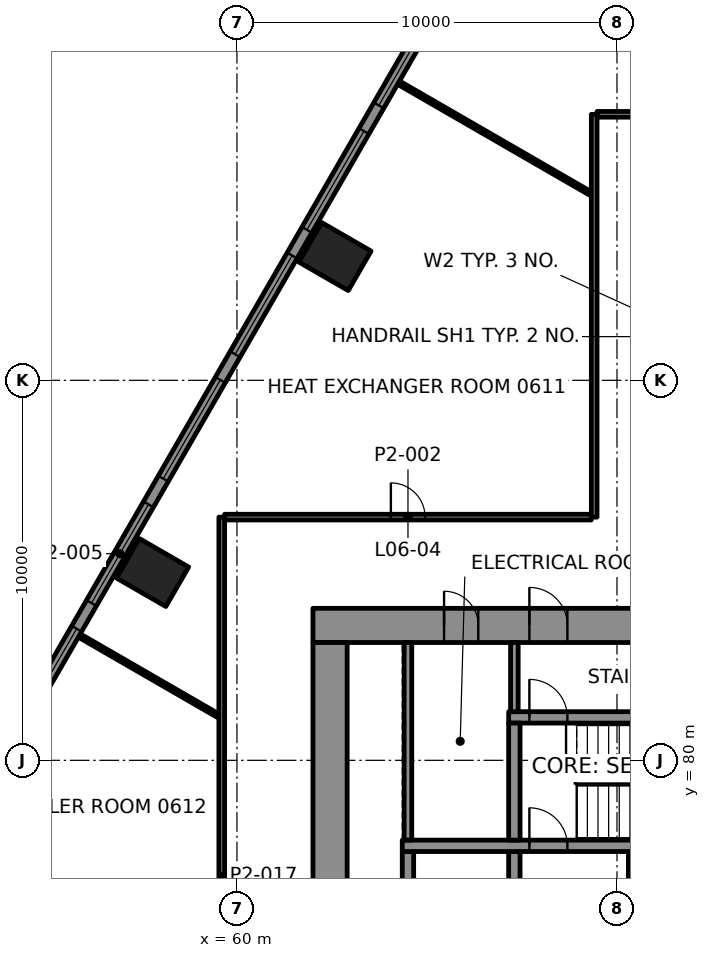
"""IFC4 building model, lengths in metres.
Left out: names, types, materials, properties, quantities, classifications, styles, units other than length and angle.
Written with IfcOpenShell. Run it as: python <this file> out.ifc"""

import sys

from ifc_helpers import new_model, si_unit, direction, frame, frame_2d, origin, origin_2d, place, context, subcontext, project, spatial, rectangle, extrude, element, fill, save


model = new_model("IFC4")
c1 = context("Model", 3, precision=1e-05, world=origin(), true_north=direction((0.0, 1.0)))
c2 = subcontext(c1, "Body", "Model", "MODEL_VIEW")
j1 = project(units=[si_unit("LENGTHUNIT", "METRE"), si_unit("PLANEANGLEUNIT", "RADIAN")], contexts=[c1])
p1 = place(None, origin())
s1 = spatial("IfcSite", under=j1, at=p1, CompositionType="ELEMENT")
p2 = place(p1, origin())
s2 = spatial("IfcBuilding", under=s1, at=p2, CompositionType="ELEMENT")
p3 = place(p2, frame((0.0, 0.0, 31.0)))
s3 = spatial("IfcBuildingStorey", under=s2, at=p3, CompositionType="ELEMENT", Elevation=31.0)
for number, where, z_axis, x_axis in (
    (1, (62.579, 93.256, -0.0), (0.0, 0.0, 1.0), (-0.5, -0.866, 0.0)),
    (2, (57.78, 84.942, -0.0), (0.0, 0.0, 1.0), (-0.5, -0.866, 0.0)),
):
    element("IfcColumn", number, at=place(p3, frame(where, z_axis=z_axis, x_axis=x_axis)), inside=s3, PredefinedType="COLUMN", context=c2, shape_type="SweptSolid", body=[
        extrude(rectangle(XDim=1.2, YDim=1.5, at=origin_2d()), origin(), (0.0, 0.0, 1.0), 4.5),
    ])
p4 = place(p3, frame((62.0, 83.55, 0.0), z_axis=(0.0, 0.0, 1.0), x_axis=(1.0, 0.0, 0.0)))
e3 = element("IfcWall", 3, at=p4, inside=s3, PredefinedType="SHEAR", context=c2, shape_type="SweptSolid", body=[
    extrude(rectangle(XDim=26.0, YDim=0.9, at=frame_2d((13.0, 0.0))), origin(), (0.0, 0.0, 1.0), 4.05),
])
p5 = place(p4, frame((5.695, 0.0, 0.0)))
e4 = element("IfcOpeningElement", 4, at=p5, cuts=e3, PredefinedType="OPENING", context=c2, shape_type="SweptSolid", body=[
    extrude(rectangle(XDim=1.0, YDim=2.1, at=frame_2d((0.5, 1.05))), frame((0.0, 0.46, 0.0), z_axis=(0.0, -1.0, 0.0), x_axis=(1.0, 0.0, 0.0)), (0.0, 0.0, 1.0), 0.92),
])
p6 = place(p4, frame((19.505, 0.0, 0.0)))
e5 = element("IfcOpeningElement", 5, at=p6, cuts=e3, PredefinedType="OPENING", context=c2, shape_type="SweptSolid", body=[
    extrude(rectangle(XDim=1.0, YDim=2.1, at=frame_2d((0.5, 1.05))), frame((0.0, 0.46, 0.0), z_axis=(0.0, -1.0, 0.0), x_axis=(1.0, 0.0, 0.0)), (0.0, 0.0, 1.0), 0.92),
])
p7 = place(p4, frame((3.45, 0.0, 0.0)))
e6 = element("IfcOpeningElement", 6, at=p7, cuts=e3, PredefinedType="OPENING", context=c2, shape_type="SweptSolid", body=[
    extrude(rectangle(XDim=0.9, YDim=2.1, at=frame_2d((0.45, 1.05))), frame((0.0, 0.46, 0.0), z_axis=(0.0, -1.0, 0.0), x_axis=(1.0, 0.0, 0.0)), (0.0, 0.0, 1.0), 0.92),
])
p8 = place(p4, frame((12.65, 0.0, 0.0)))
e7 = element("IfcOpeningElement", 7, at=p8, cuts=e3, PredefinedType="OPENING", context=c2, shape_type="SweptSolid", body=[
    extrude(rectangle(XDim=0.9, YDim=2.1, at=frame_2d((0.45, 1.05))), frame((0.0, 0.46, 0.0), z_axis=(0.0, -1.0, 0.0), x_axis=(1.0, 0.0, 0.0)), (0.0, 0.0, 1.0), 0.92),
])
p9 = place(p4, frame((22.55, 0.0, 0.0)))
e8 = element("IfcOpeningElement", 8, at=p9, cuts=e3, PredefinedType="OPENING", context=c2, shape_type="SweptSolid", body=[
    extrude(rectangle(XDim=0.9, YDim=2.1, at=frame_2d((0.45, 1.05))), frame((0.0, 0.46, 0.0), z_axis=(0.0, -1.0, 0.0), x_axis=(1.0, 0.0, 0.0)), (0.0, 0.0, 1.0), 0.92),
])
p10 = place(p3, frame((62.45, 66.9, 0.0), z_axis=(0.0, 0.0, 1.0), x_axis=(0.0, 1.0, 0.0)))
e9 = element("IfcWall", 9, at=p10, inside=s3, PredefinedType="SHEAR", context=c2, shape_type="SweptSolid", body=[
    extrude(rectangle(XDim=16.2, YDim=0.9, at=frame_2d((8.1, 0.0))), origin(), (0.0, 0.0, 1.0), 4.05),
])
p11 = place(p10, frame((5.5, 0.0, 0.0)))
e10 = element("IfcOpeningElement", 10, at=p11, cuts=e9, PredefinedType="OPENING", context=c2, shape_type="SweptSolid", body=[
    extrude(rectangle(XDim=1.8, YDim=2.1, at=frame_2d((0.9, 1.05))), frame((0.0, 0.46, 0.0), z_axis=(0.0, -1.0, 0.0), x_axis=(1.0, 0.0, 0.0)), (0.0, 0.0, 1.0), 0.92),
])
for number, where, z_axis, x_axis in (
    (11, (64.5, 75.0, 0.0), (0.0, 0.0, 1.0), (0.0, 1.0, 0.0)),
    (12, (67.3, 75.0, 0.0), (0.0, 0.0, 1.0), (0.0, 1.0, 0.0)),
):
    element("IfcWall", number, at=place(p3, frame(where, z_axis=z_axis, x_axis=x_axis)), inside=s3, PredefinedType="SHEAR", context=c2, shape_type="SweptSolid", body=[
        extrude(rectangle(XDim=2.6, YDim=0.3, at=frame_2d((1.3, 0.0))), origin(), (0.0, 0.0, 1.0), 4.05),
    ])
p12 = place(p3, frame((70.45, 75.0, 0.0), z_axis=(0.0, 0.0, 1.0), x_axis=(0.0, 1.0, 0.0)))
e13 = element("IfcWall", 13, at=p12, inside=s3, PredefinedType="SHEAR", context=c2, shape_type="SweptSolid", body=[
    extrude(rectangle(XDim=2.6, YDim=0.3, at=frame_2d((1.3, 0.0))), origin(), (0.0, 0.0, 1.0), 4.05),
])
p13 = place(p12, frame((0.15, 0.0, 0.0)))
e14 = element("IfcOpeningElement", 14, at=p13, cuts=e13, PredefinedType="OPENING", context=c2, shape_type="SweptSolid", body=[
    extrude(rectangle(XDim=1.1, YDim=2.1, at=frame_2d((0.55, 1.05))), frame((0.0, 0.16, 0.0), z_axis=(0.0, -1.0, 0.0), x_axis=(1.0, 0.0, 0.0)), (0.0, 0.0, 1.0), 0.32),
])
p14 = place(p3, frame((64.35, 77.75, 0.0), z_axis=(0.0, 0.0, 1.0), x_axis=(1.0, 0.0, 0.0)))
e15 = element("IfcWall", 15, at=p14, inside=s3, PredefinedType="SHEAR", context=c2, shape_type="SweptSolid", body=[
    extrude(rectangle(XDim=22.75, YDim=0.3, at=frame_2d((11.375, 0.0))), origin(), (0.0, 0.0, 1.0), 4.05),
])
p15 = place(p14, frame((3.345, 0.0, 0.0)))
e16 = element("IfcOpeningElement", 16, at=p15, cuts=e15, PredefinedType="OPENING", context=c2, shape_type="SweptSolid", body=[
    extrude(rectangle(XDim=1.0, YDim=2.1, at=frame_2d((0.5, 1.05))), frame((0.0, 0.16, 0.0), z_axis=(0.0, -1.0, 0.0), x_axis=(1.0, 0.0, 0.0)), (0.0, 0.0, 1.0), 0.32),
])
p16 = place(p3, frame((67.15, 81.13, 0.0), z_axis=(0.0, 0.0, 1.0), x_axis=(1.0, 0.0, 0.0)))
e17 = element("IfcWall", 17, at=p16, inside=s3, PredefinedType="SHEAR", context=c2, shape_type="SweptSolid", body=[
    extrude(rectangle(XDim=6.91, YDim=0.3, at=frame_2d((3.455, 0.0))), origin(), (0.0, 0.0, 1.0), 4.05),
])
p17 = place(p16, frame((0.545, 0.0, 0.0)))
e18 = element("IfcOpeningElement", 18, at=p17, cuts=e17, PredefinedType="OPENING", context=c2, shape_type="SweptSolid", body=[
    extrude(rectangle(XDim=1.0, YDim=2.1, at=frame_2d((0.5, 1.05))), frame((0.0, 0.16, 0.0), z_axis=(0.0, -1.0, 0.0), x_axis=(1.0, 0.0, 0.0)), (0.0, 0.0, 1.0), 0.32),
])
p18 = place(p3, frame((67.3, 77.9, 0.0), z_axis=(0.0, 0.0, 1.0), x_axis=(0.0, 1.0, 0.0)))
e19 = element("IfcWall", 19, at=p18, inside=s3, PredefinedType="SHEAR", context=c2, shape_type="SweptSolid", body=[
    extrude(rectangle(XDim=3.08, YDim=0.3, at=frame_2d((1.54, 0.0))), origin(), (0.0, 0.0, 1.0), 4.05),
])
p19 = place(p3, frame((59.676, 86.4, 0.0), z_axis=(0.0, 0.0, 1.0), x_axis=(1.0, 0.0, 0.0)))
e20 = element("IfcWall", 20, at=p19, inside=s3, PredefinedType="PARTITIONING", context=c2, shape_type="SweptSolid", body=[
    extrude(rectangle(XDim=9.649, YDim=0.15, at=frame_2d((4.825, 0.0))), origin(), (0.0, 0.0, 1.0), 3.45),
])
p20 = place(p19, frame((4.375, 0.0, 0.0)))
e21 = element("IfcOpeningElement", 21, at=p20, cuts=e20, PredefinedType="OPENING", context=c2, shape_type="SweptSolid", body=[
    extrude(rectangle(XDim=0.9, YDim=2.1, at=frame_2d((0.45, 1.05))), frame((0.0, 0.085, 0.0), z_axis=(0.0, -1.0, 0.0), x_axis=(1.0, 0.0, 0.0)), (0.0, 0.0, 1.0), 0.17),
])
p21 = place(p3, frame((69.476, 97.0, 0.0), z_axis=(0.0, 0.0, 1.0), x_axis=(1.0, 0.0, 0.0)))
e22 = element("IfcWall", 22, at=p21, inside=s3, PredefinedType="PARTITIONING", context=c2, shape_type="SweptSolid", body=[
    extrude(rectangle(XDim=4.25, YDim=0.15, at=frame_2d((2.125, 0.0))), origin(), (0.0, 0.0, 1.0), 3.45),
])
p22 = place(p21, frame((1.675, 0.0, 0.0)))
e23 = element("IfcOpeningElement", 23, at=p22, cuts=e22, PredefinedType="OPENING", context=c2, shape_type="SweptSolid", body=[
    extrude(rectangle(XDim=0.9, YDim=2.1, at=frame_2d((0.45, 1.05))), frame((0.0, 0.085, 0.0), z_axis=(0.0, -1.0, 0.0), x_axis=(1.0, 0.0, 0.0)), (0.0, 0.0, 1.0), 0.17),
])
p23 = place(p3, frame((69.4, 86.4, 0.0), z_axis=(0.0, 0.0, 1.0), x_axis=(0.0, 1.0, 0.0)))
e24 = element("IfcWall", 24, at=p23, inside=s3, PredefinedType="PARTITIONING", context=c2, shape_type="SweptSolid", body=[
    extrude(rectangle(XDim=10.6, YDim=0.15, at=frame_2d((5.3, 0.0))), origin(), (0.0, 0.0, 1.0), 3.45),
])
p24 = place(p3, frame((59.6, 67.494, 0.0), z_axis=(0.0, 0.0, 1.0), x_axis=(0.0, 1.0, 0.0)))
e25 = element("IfcWall", 25, at=p24, inside=s3, PredefinedType="PARTITIONING", context=c2, shape_type="SweptSolid", body=[
    extrude(rectangle(XDim=18.905, YDim=0.15, at=frame_2d((9.453, 0.0))), origin(), (0.0, 0.0, 1.0), 3.45),
])
p25 = place(p24, frame((7.633, 0.0, 0.0)))
e26 = element("IfcOpeningElement", 26, at=p25, cuts=e25, PredefinedType="OPENING", context=c2, shape_type="SweptSolid", body=[
    extrude(rectangle(XDim=0.9, YDim=2.1, at=frame_2d((0.45, 1.05))), frame((0.0, 0.085, 0.0), z_axis=(0.0, -1.0, 0.0), x_axis=(1.0, 0.0, 0.0)), (0.0, 0.0, 1.0), 0.17),
])
p26 = place(p3, frame((69.299, 94.919, 0.0), z_axis=(0.0, 0.0, 1.0), x_axis=(-0.866023528471, 0.500003248124, 0.0)))
e27 = element("IfcWall", 27, at=p26, inside=s3, PredefinedType="PARTITIONING", context=c2, shape_type="SweptSolid", body=[
    extrude(rectangle(XDim=5.946, YDim=0.1, at=frame_2d((2.973, 0.0))), origin(), (0.0, 0.0, 1.0), 3.215),
])
p27 = place(p3, frame((59.499, 81.178, 0.0), z_axis=(0.0, 0.0, 1.0), x_axis=(-0.866009972995, 0.500026725959, 0.0)))
e28 = element("IfcWall", 28, at=p27, inside=s3, PredefinedType="PARTITIONING", context=c2, shape_type="SweptSolid", body=[
    extrude(rectangle(XDim=4.329, YDim=0.1, at=frame_2d((2.165, 0.0))), origin(), (0.0, 0.0, 1.0), 3.215),
])
p28 = place(p3, frame((71.348, 110.424, 0.0), z_axis=(0.0, 0.0, 1.0), x_axis=(-0.500000550228, -0.86602508611, 0.0)))
e29 = element("IfcWall", 29, at=p28, inside=s3, PredefinedType="SOLIDWALL", context=c2, shape_type="SweptSolid", body=[
    extrude(rectangle(XDim=57.704, YDim=0.3, at=frame_2d((28.852, 0.0))), origin(), (0.0, 0.0, 1.0), 4.05),
])
p29 = place(p28, frame((0.89, 0.0, 0.8)))
e30 = element("IfcOpeningElement", 30, at=p29, cuts=e29, PredefinedType="OPENING", context=c2, shape_type="SweptSolid", body=[
    extrude(rectangle(XDim=3.0, YDim=2.4, at=frame_2d((1.5, 1.2))), frame((0.0, 0.16, 0.0), z_axis=(0.0, -1.0, 0.0), x_axis=(1.0, 0.0, 0.0)), (0.0, 0.0, 1.0), 0.32),
])
p30 = place(p28, frame((4.67, 0.0, 0.8)))
e31 = element("IfcOpeningElement", 31, at=p30, cuts=e29, PredefinedType="OPENING", context=c2, shape_type="SweptSolid", body=[
    extrude(rectangle(XDim=3.0, YDim=2.4, at=frame_2d((1.5, 1.2))), frame((0.0, 0.16, 0.0), z_axis=(0.0, -1.0, 0.0), x_axis=(1.0, 0.0, 0.0)), (0.0, 0.0, 1.0), 0.32),
])
p31 = place(p28, frame((8.451, 0.0, 0.8)))
e32 = element("IfcOpeningElement", 32, at=p31, cuts=e29, PredefinedType="OPENING", context=c2, shape_type="SweptSolid", body=[
    extrude(rectangle(XDim=3.0, YDim=2.4, at=frame_2d((1.5, 1.2))), frame((0.0, 0.16, 0.0), z_axis=(0.0, -1.0, 0.0), x_axis=(1.0, 0.0, 0.0)), (0.0, 0.0, 1.0), 0.32),
])
p32 = place(p28, frame((12.231, 0.0, 0.8)))
e33 = element("IfcOpeningElement", 33, at=p32, cuts=e29, PredefinedType="OPENING", context=c2, shape_type="SweptSolid", body=[
    extrude(rectangle(XDim=3.0, YDim=2.4, at=frame_2d((1.5, 1.2))), frame((0.0, 0.16, 0.0), z_axis=(0.0, -1.0, 0.0), x_axis=(1.0, 0.0, 0.0)), (0.0, 0.0, 1.0), 0.32),
])
p33 = place(p28, frame((16.011, 0.0, 0.8)))
e34 = element("IfcOpeningElement", 34, at=p33, cuts=e29, PredefinedType="OPENING", context=c2, shape_type="SweptSolid", body=[
    extrude(rectangle(XDim=3.0, YDim=2.4, at=frame_2d((1.5, 1.2))), frame((0.0, 0.16, 0.0), z_axis=(0.0, -1.0, 0.0), x_axis=(1.0, 0.0, 0.0)), (0.0, 0.0, 1.0), 0.32),
])
p34 = place(p28, frame((19.792, 0.0, 0.8)))
e35 = element("IfcOpeningElement", 35, at=p34, cuts=e29, PredefinedType="OPENING", context=c2, shape_type="SweptSolid", body=[
    extrude(rectangle(XDim=3.0, YDim=2.4, at=frame_2d((1.5, 1.2))), frame((0.0, 0.16, 0.0), z_axis=(0.0, -1.0, 0.0), x_axis=(1.0, 0.0, 0.0)), (0.0, 0.0, 1.0), 0.32),
])
p35 = place(p28, frame((23.572, 0.0, 0.8)))
e36 = element("IfcOpeningElement", 36, at=p35, cuts=e29, PredefinedType="OPENING", context=c2, shape_type="SweptSolid", body=[
    extrude(rectangle(XDim=3.0, YDim=2.4, at=frame_2d((1.5, 1.2))), frame((0.0, 0.16, 0.0), z_axis=(0.0, -1.0, 0.0), x_axis=(1.0, 0.0, 0.0)), (0.0, 0.0, 1.0), 0.32),
])
p36 = place(p28, frame((27.352, 0.0, 0.8)))
e37 = element("IfcOpeningElement", 37, at=p36, cuts=e29, PredefinedType="OPENING", context=c2, shape_type="SweptSolid", body=[
    extrude(rectangle(XDim=3.0, YDim=2.4, at=frame_2d((1.5, 1.2))), frame((0.0, 0.16, 0.0), z_axis=(0.0, -1.0, 0.0), x_axis=(1.0, 0.0, 0.0)), (0.0, 0.0, 1.0), 0.32),
])
p37 = place(p28, frame((31.132, 0.0, 0.8)))
e38 = element("IfcOpeningElement", 38, at=p37, cuts=e29, PredefinedType="OPENING", context=c2, shape_type="SweptSolid", body=[
    extrude(rectangle(XDim=3.0, YDim=2.4, at=frame_2d((1.5, 1.2))), frame((0.0, 0.16, 0.0), z_axis=(0.0, -1.0, 0.0), x_axis=(1.0, 0.0, 0.0)), (0.0, 0.0, 1.0), 0.32),
])
p38 = place(p28, frame((34.913, 0.0, 0.8)))
e39 = element("IfcOpeningElement", 39, at=p38, cuts=e29, PredefinedType="OPENING", context=c2, shape_type="SweptSolid", body=[
    extrude(rectangle(XDim=3.0, YDim=2.4, at=frame_2d((1.5, 1.2))), frame((0.0, 0.16, 0.0), z_axis=(0.0, -1.0, 0.0), x_axis=(1.0, 0.0, 0.0)), (0.0, 0.0, 1.0), 0.32),
])
p39 = place(p28, frame((38.693, 0.0, 0.8)))
e40 = element("IfcOpeningElement", 40, at=p39, cuts=e29, PredefinedType="OPENING", context=c2, shape_type="SweptSolid", body=[
    extrude(rectangle(XDim=3.0, YDim=2.4, at=frame_2d((1.5, 1.2))), frame((0.0, 0.16, 0.0), z_axis=(0.0, -1.0, 0.0), x_axis=(1.0, 0.0, 0.0)), (0.0, 0.0, 1.0), 0.32),
])
p40 = place(p28, frame((42.473, 0.0, 0.8)))
e41 = element("IfcOpeningElement", 41, at=p40, cuts=e29, PredefinedType="OPENING", context=c2, shape_type="SweptSolid", body=[
    extrude(rectangle(XDim=3.0, YDim=2.4, at=frame_2d((1.5, 1.2))), frame((0.0, 0.16, 0.0), z_axis=(0.0, -1.0, 0.0), x_axis=(1.0, 0.0, 0.0)), (0.0, 0.0, 1.0), 0.32),
])
p41 = place(p28, frame((46.253, 0.0, 0.8)))
e42 = element("IfcOpeningElement", 42, at=p41, cuts=e29, PredefinedType="OPENING", context=c2, shape_type="SweptSolid", body=[
    extrude(rectangle(XDim=3.0, YDim=2.4, at=frame_2d((1.5, 1.2))), frame((0.0, 0.16, 0.0), z_axis=(0.0, -1.0, 0.0), x_axis=(1.0, 0.0, 0.0)), (0.0, 0.0, 1.0), 0.32),
])
p42 = place(p28, frame((50.033, 0.0, 0.8)))
e43 = element("IfcOpeningElement", 43, at=p42, cuts=e29, PredefinedType="OPENING", context=c2, shape_type="SweptSolid", body=[
    extrude(rectangle(XDim=3.0, YDim=2.4, at=frame_2d((1.5, 1.2))), frame((0.0, 0.16, 0.0), z_axis=(0.0, -1.0, 0.0), x_axis=(1.0, 0.0, 0.0)), (0.0, 0.0, 1.0), 0.32),
])
p43 = place(p28, frame((53.814, 0.0, 0.8)))
e44 = element("IfcOpeningElement", 44, at=p43, cuts=e29, PredefinedType="OPENING", context=c2, shape_type="SweptSolid", body=[
    extrude(rectangle(XDim=3.0, YDim=2.4, at=frame_2d((1.5, 1.2))), frame((0.0, 0.16, 0.0), z_axis=(0.0, -1.0, 0.0), x_axis=(1.0, 0.0, 0.0)), (0.0, 0.0, 1.0), 0.32),
])
p44 = place(p3, frame((64.5, 77.9, 0.0), z_axis=(0.0, 0.0, 1.0), x_axis=(0.0, 1.0, 0.0)))
e45 = element("IfcWall", 45, at=p44, inside=s3, PredefinedType="PARTITIONING", context=c2, shape_type="SweptSolid", body=[
    extrude(rectangle(XDim=5.2, YDim=0.2, at=frame_2d((2.6, 0.0))), origin(), (0.0, 0.0, 1.0), 4.05),
])
p45 = place(p3, frame((67.3, 81.28, 0.0), z_axis=(0.0, 0.0, 1.0), x_axis=(0.0, 1.0, 0.0)))
e46 = element("IfcWall", 46, at=p45, inside=s3, PredefinedType="PARTITIONING", context=c2, shape_type="SweptSolid", body=[
    extrude(rectangle(XDim=1.82, YDim=0.2, at=frame_2d((0.91, 0.0))), origin(), (0.0, 0.0, 1.0), 4.05),
])
p46 = place(p20, origin())
e47 = element("IfcDoor", 47, at=p46, inside=s3, OperationType="SINGLE_SWING_RIGHT", PredefinedType="DOOR", context=c2, shape_type="SweptSolid", body=[
    extrude(rectangle(XDim=0.9, YDim=2.1, at=frame_2d((0.45, 1.05))), frame((0.0, 0.025, 0.0), z_axis=(0.0, -1.0, 0.0), x_axis=(1.0, 0.0, 0.0)), (0.0, 0.0, 1.0), 0.05),
])
fill(e21, e47)
p47 = place(p32, origin())
e48 = element("IfcWindow", 48, at=p47, inside=s3, PartitioningType="SINGLE_PANEL", PredefinedType="WINDOW", context=c2, shape_type="SweptSolid", body=[
    extrude(rectangle(XDim=3.0, YDim=2.4, at=frame_2d((1.5, 1.2))), frame((0.0, 0.03, 0.0), z_axis=(0.0, -1.0, 0.0), x_axis=(1.0, 0.0, 0.0)), (0.0, 0.0, 1.0), 0.06),
])
fill(e33, e48)
p48 = place(p33, origin())
e49 = element("IfcWindow", 49, at=p48, inside=s3, PartitioningType="SINGLE_PANEL", PredefinedType="WINDOW", context=c2, shape_type="SweptSolid", body=[
    extrude(rectangle(XDim=3.0, YDim=2.4, at=frame_2d((1.5, 1.2))), frame((0.0, 0.03, 0.0), z_axis=(0.0, -1.0, 0.0), x_axis=(1.0, 0.0, 0.0)), (0.0, 0.0, 1.0), 0.06),
])
fill(e34, e49)
p49 = place(p34, origin())
e50 = element("IfcWindow", 50, at=p49, inside=s3, PartitioningType="SINGLE_PANEL", PredefinedType="WINDOW", context=c2, shape_type="SweptSolid", body=[
    extrude(rectangle(XDim=3.0, YDim=2.4, at=frame_2d((1.5, 1.2))), frame((0.0, 0.03, 0.0), z_axis=(0.0, -1.0, 0.0), x_axis=(1.0, 0.0, 0.0)), (0.0, 0.0, 1.0), 0.06),
])
fill(e35, e50)
p50 = place(p35, origin())
e51 = element("IfcWindow", 51, at=p50, inside=s3, PartitioningType="SINGLE_PANEL", PredefinedType="WINDOW", context=c2, shape_type="SweptSolid", body=[
    extrude(rectangle(XDim=3.0, YDim=2.4, at=frame_2d((1.5, 1.2))), frame((0.0, 0.03, 0.0), z_axis=(0.0, -1.0, 0.0), x_axis=(1.0, 0.0, 0.0)), (0.0, 0.0, 1.0), 0.06),
])
fill(e36, e51)
p51 = place(p36, origin())
e52 = element("IfcWindow", 52, at=p51, inside=s3, PartitioningType="SINGLE_PANEL", PredefinedType="WINDOW", context=c2, shape_type="SweptSolid", body=[
    extrude(rectangle(XDim=3.0, YDim=2.4, at=frame_2d((1.5, 1.2))), frame((0.0, 0.03, 0.0), z_axis=(0.0, -1.0, 0.0), x_axis=(1.0, 0.0, 0.0)), (0.0, 0.0, 1.0), 0.06),
])
fill(e37, e52)
p52 = place(p37, origin())
e53 = element("IfcWindow", 53, at=p52, inside=s3, PartitioningType="SINGLE_PANEL", PredefinedType="WINDOW", context=c2, shape_type="SweptSolid", body=[
    extrude(rectangle(XDim=3.0, YDim=2.4, at=frame_2d((1.5, 1.2))), frame((0.0, 0.03, 0.0), z_axis=(0.0, -1.0, 0.0), x_axis=(1.0, 0.0, 0.0)), (0.0, 0.0, 1.0), 0.06),
])
fill(e38, e53)
p53 = place(p15, origin())
e54 = element("IfcDoor", 54, at=p53, inside=s3, OperationType="SINGLE_SWING_LEFT", PredefinedType="DOOR", context=c2, shape_type="SweptSolid", body=[
    extrude(rectangle(XDim=1.0, YDim=2.1, at=frame_2d((0.5, 1.05))), frame((0.0, 0.025, 0.0), z_axis=(0.0, -1.0, 0.0), x_axis=(1.0, 0.0, 0.0)), (0.0, 0.0, 1.0), 0.05),
])
fill(e16, e54)
p54 = place(p17, origin())
e55 = element("IfcDoor", 55, at=p54, inside=s3, OperationType="SINGLE_SWING_RIGHT", PredefinedType="DOOR", context=c2, shape_type="SweptSolid", body=[
    extrude(rectangle(XDim=1.0, YDim=2.1, at=frame_2d((0.5, 1.05))), frame((0.0, 0.025, 0.0), z_axis=(0.0, -1.0, 0.0), x_axis=(1.0, 0.0, 0.0)), (0.0, 0.0, 1.0), 0.05),
])
fill(e18, e55)
p55 = place(p5, origin())
e56 = element("IfcDoor", 56, at=p55, inside=s3, OperationType="SINGLE_SWING_LEFT", PredefinedType="DOOR", context=c2, shape_type="SweptSolid", body=[
    extrude(rectangle(XDim=1.0, YDim=2.1, at=frame_2d((0.5, 1.05))), frame((0.0, 0.17, 0.0), z_axis=(0.0, -1.0, 0.0), x_axis=(1.0, 0.0, 0.0)), (0.0, 0.0, 1.0), 0.34),
])
fill(e4, e56)
p56 = place(p7, origin())
e57 = element("IfcDoor", 57, at=p56, inside=s3, OperationType="SINGLE_SWING_RIGHT", PredefinedType="DOOR", context=c2, shape_type="SweptSolid", body=[
    extrude(rectangle(XDim=0.9, YDim=2.1, at=frame_2d((0.45, 1.05))), frame((0.0, 0.17, 0.0), z_axis=(0.0, -1.0, 0.0), x_axis=(1.0, 0.0, 0.0)), (0.0, 0.0, 1.0), 0.34),
])
fill(e6, e57)
save(model, sys.argv[1])
